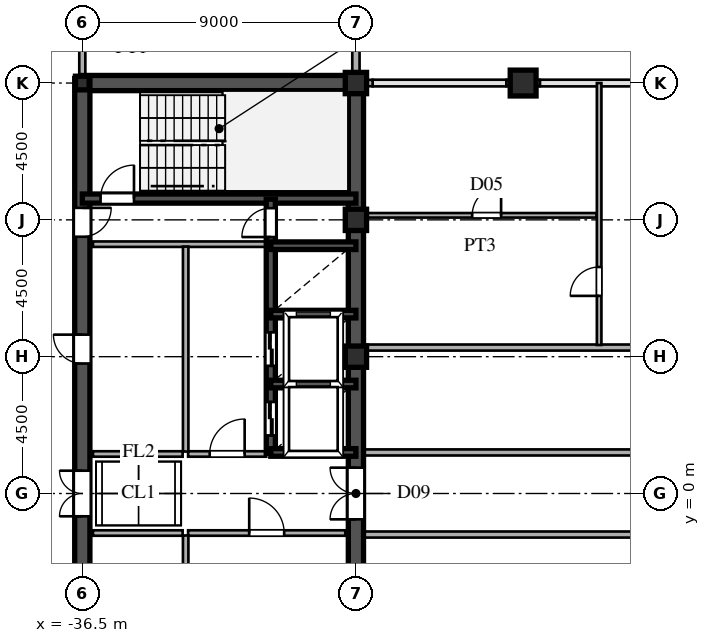
"""IFC4 building model, lengths in metres.
Left out: names, types, materials, properties, quantities, classifications, styles, units other than length and angle.
Written with IfcOpenShell. Run it as: python <this file> out.ifc"""

import sys

from ifc_helpers import new_model, si_unit, direction, frame, frame_2d, origin, origin_2d, place, context, subcontext, project, spatial, rectangle, hollow_rectangle, i_section, extrude, source, transform, mapped, element, fill, save


model = new_model("IFC4")
c1 = context("Model", 3, precision=1e-05, world=origin(), true_north=direction((0.0, 1.0)))
c2 = subcontext(c1, "Body", "Model", "MODEL_VIEW")
j1 = project(units=[si_unit("LENGTHUNIT", "METRE"), si_unit("PLANEANGLEUNIT", "RADIAN")], contexts=[c1])
p1 = place(None, origin())
s1 = spatial("IfcSite", under=j1, at=p1, CompositionType="ELEMENT")
p2 = place(p1, origin())
s2 = spatial("IfcBuilding", under=s1, at=p2, CompositionType="ELEMENT")
p3 = place(p2, frame((0.0, 0.0, 250.65)))
s3 = spatial("IfcBuildingStorey", under=s2, at=p3, CompositionType="ELEMENT", Elevation=250.65)
m1 = source(origin(), c2, "Body", "SweptSolid", [
    extrude(hollow_rectangle(XDim=0.7, YDim=0.7, WallThickness=0.03, at=origin_2d()), origin(), (0.0, 0.0, 1.0), 3.75),
])
for number, where, z_axis, x_axis in (
    (1, (-27.5, 4.5, 0.0), (0.0, 0.0, 1.0), (1.0, 0.0, 0.0)),
    (2, (-27.5, 9.0, 0.0), (0.0, 0.0, 1.0), (1.0, 0.0, 0.0)),
    (3, (-27.5, 13.5, 0.0), (0.0, 0.0, 1.0), (1.0, 0.0, 0.0)),
):
    element("IfcColumn", number, at=place(p3, frame(where, z_axis=z_axis, x_axis=x_axis)), inside=s3, PredefinedType="COLUMN", context=c2, shape_type="MappedRepresentation", body=[
        mapped(m1, transform((0.0, 0.0, 0.0), scale=1.0)),
    ])
m2 = source(origin(), c2, "Body", "SweptSolid", [
    extrude(i_section(OverallWidth=0.45, OverallDepth=0.45, WebThickness=0.016, FlangeThickness=0.025, at=origin_2d()), origin(), (0.0, 0.0, 1.0), 3.75),
])
p4 = place(p3, frame((-36.5, 13.5, 0.0), z_axis=(0.0, 0.0, 1.0), x_axis=(1.0, 0.0, 0.0)))
e4 = element("IfcColumn", 4, at=p4, inside=s3, PredefinedType="COLUMN", context=c2, shape_type="MappedRepresentation", body=[
    mapped(m2, transform((0.0, 0.0, 0.0), scale=1.0)),
])
m3 = source(origin(), c2, "Body", "SweptSolid", [
    extrude(hollow_rectangle(XDim=0.85, YDim=0.85, WallThickness=0.036, at=origin_2d()), origin(), (0.0, 0.0, 1.0), 3.75),
])
p5 = place(p3, frame((-22.0, 13.5, 0.0), z_axis=(0.0, 0.0, 1.0), x_axis=(1.0, 0.0, 0.0)))
e5 = element("IfcColumn", 5, at=p5, inside=s3, PredefinedType="COLUMN", context=c2, shape_type="MappedRepresentation", body=[
    mapped(m3, transform((0.0, 0.0, 0.0), scale=1.0)),
])
p6 = place(p3, frame((-27.5, 13.755, 0.0), z_axis=(0.0, 0.0, 1.0), x_axis=(0.0, 1.0, 0.0)))
e6 = element("IfcWall", 6, at=p6, inside=s3, PredefinedType="SOLIDWALL", context=c2, shape_type="SweptSolid", body=[
    extrude(rectangle(XDim=0.62, YDim=0.24, at=frame_2d((0.31, 0.0))), origin(), (0.0, 0.0, 1.0), 3.03),
])
p7 = place(p3, frame((-27.5, 14.375, 0.0), z_axis=(0.0, 0.0, 1.0), x_axis=(0.0, 1.0, 0.0)))
e7 = element("IfcWall", 7, at=p7, inside=s3, PredefinedType="SOLIDWALL", context=c2, shape_type="SweptSolid", body=[
    extrude(rectangle(XDim=1.605, YDim=0.24, at=frame_2d((0.803, 0.0))), origin(), (0.0, 0.0, 1.0), 3.53),
])
p8 = place(p3, frame((-27.49, 13.5, 0.0), z_axis=(0.0, 0.0, 1.0), x_axis=(1.0, 0.0, 0.0)))
e8 = element("IfcWall", 8, at=p8, inside=s3, PredefinedType="SOLIDWALL", context=c2, shape_type="SweptSolid", body=[
    extrude(rectangle(XDim=0.54, YDim=0.21, at=frame_2d((0.27, 0.0))), origin(), (0.0, 0.0, 1.0), 3.03),
])
p9 = place(p3, frame((-22.55, 13.5, 0.0), z_axis=(0.0, 0.0, 1.0), x_axis=(1.0, 0.0, 0.0)))
e9 = element("IfcWall", 9, at=p9, inside=s3, PredefinedType="SOLIDWALL", context=c2, shape_type="SweptSolid", body=[
    extrude(rectangle(XDim=1.1, YDim=0.21, at=frame_2d((0.55, 0.0))), origin(), (0.0, 0.0, 1.0), 3.03),
])
for number, where, z_axis, x_axis in (
    (10, (-27.5, -13.5, 0.0), (0.0, 0.0, 1.0), (0.0, 1.0, 0.0)),
    (11, (-27.5, 1.3, 0.0), (0.0, 0.0, 1.0), (0.0, 1.0, 0.0)),
):
    element("IfcWall", number, at=place(p3, frame(where, z_axis=z_axis, x_axis=x_axis)), inside=s3, PredefinedType="SHEAR", context=c2, shape_type="SweptSolid", body=[
        extrude(rectangle(XDim=12.2, YDim=0.5, at=frame_2d((6.1, 0.0))), origin(), (0.0, 0.0, 1.0), 3.53),
    ])
p10 = place(p3, frame((-27.5, -1.3, 0.0), z_axis=(0.0, 0.0, 1.0), x_axis=(0.0, 1.0, 0.0)))
e12 = element("IfcWall", 12, at=p10, inside=s3, PredefinedType="SHEAR", context=c2, shape_type="SweptSolid", body=[
    extrude(rectangle(XDim=2.6, YDim=0.5, at=frame_2d((1.3, 0.0))), origin(), (0.0, 0.0, 1.0), 3.53),
])
p11 = place(p10, frame((0.45, 0.0, 0.0)))
e13 = element("IfcOpeningElement", 13, at=p11, cuts=e12, PredefinedType="OPENING", context=c2, shape_type="SweptSolid", body=[
    extrude(rectangle(XDim=1.7, YDim=2.35, at=frame_2d((0.85, 1.175))), frame((0.0, 0.26, 0.0), z_axis=(0.0, -1.0, 0.0), x_axis=(1.0, 0.0, 0.0)), (0.0, 0.0, 1.0), 0.52),
])
p12 = place(p3, frame((-36.5, 13.5, 0.0), z_axis=(0.0, 0.0, 1.0), x_axis=(1.0, 0.0, 0.0)))
e14 = element("IfcWall", 14, at=p12, inside=s3, PredefinedType="SHEAR", context=c2, shape_type="SweptSolid", body=[
    extrude(rectangle(XDim=9.0, YDim=0.5, at=frame_2d((4.5, 0.0))), origin(), (0.0, 0.0, 1.0), 3.53),
])
p13 = place(p3, frame((-36.5, -1.3, 0.0), z_axis=(0.0, 0.0, 1.0), x_axis=(0.0, 1.0, 0.0)))
e15 = element("IfcWall", 15, at=p13, inside=s3, PredefinedType="SHEAR", context=c2, shape_type="SweptSolid", body=[
    extrude(rectangle(XDim=2.6, YDim=0.5, at=frame_2d((1.3, 0.0))), origin(), (0.0, 0.0, 1.0), 3.53),
])
p14 = place(p13, frame((0.55, 0.0, 0.0)))
e16 = element("IfcOpeningElement", 16, at=p14, cuts=e15, PredefinedType="OPENING", context=c2, shape_type="SweptSolid", body=[
    extrude(rectangle(XDim=1.5, YDim=2.3, at=frame_2d((0.75, 1.15))), frame((0.0, 0.26, 0.0), z_axis=(0.0, -1.0, 0.0), x_axis=(1.0, 0.0, 0.0)), (0.0, 0.0, 1.0), 0.52),
])
p15 = place(p3, frame((-36.5, 8.2, 0.0), z_axis=(0.0, 0.0, 1.0), x_axis=(0.0, 1.0, 0.0)))
e17 = element("IfcWall", 17, at=p15, inside=s3, PredefinedType="SHEAR", context=c2, shape_type="SweptSolid", body=[
    extrude(rectangle(XDim=5.45, YDim=0.5, at=frame_2d((2.725, 0.0))), origin(), (0.0, 0.0, 1.0), 3.53),
])
p16 = place(p15, frame((0.245, 0.0, 0.0)))
e18 = element("IfcOpeningElement", 18, at=p16, cuts=e17, PredefinedType="OPENING", context=c2, shape_type="SweptSolid", body=[
    extrude(rectangle(XDim=0.95, YDim=2.15, at=frame_2d((0.475, 1.075))), frame((0.0, 0.26, 0.0), z_axis=(0.0, -1.0, 0.0), x_axis=(1.0, 0.0, 0.0)), (0.0, 0.0, 1.0), 0.52),
])
p17 = place(p3, frame((-36.5, -6.5, 0.0), z_axis=(0.0, 0.0, 1.0), x_axis=(0.0, 1.0, 0.0)))
e19 = element("IfcWall", 19, at=p17, inside=s3, PredefinedType="SHEAR", context=c2, shape_type="SweptSolid", body=[
    extrude(rectangle(XDim=5.2, YDim=0.5, at=frame_2d((2.6, 0.0))), origin(), (0.0, 0.0, 1.0), 3.53),
])
p18 = place(p17, frame((2.125, 0.0, 0.0)))
e20 = element("IfcOpeningElement", 20, at=p18, cuts=e19, PredefinedType="OPENING", context=c2, shape_type="SweptSolid", body=[
    extrude(rectangle(XDim=0.95, YDim=2.15, at=frame_2d((0.475, 1.075))), frame((0.0, 0.26, 0.0), z_axis=(0.0, -1.0, 0.0), x_axis=(1.0, 0.0, 0.0)), (0.0, 0.0, 1.0), 0.52),
])
p19 = place(p3, frame((-36.5, 1.3, 0.0), z_axis=(0.0, 0.0, 1.0), x_axis=(0.0, 1.0, 0.0)))
e21 = element("IfcWall", 21, at=p19, inside=s3, PredefinedType="SHEAR", context=c2, shape_type="SweptSolid", body=[
    extrude(rectangle(XDim=6.9, YDim=0.5, at=frame_2d((3.45, 0.0))), origin(), (0.0, 0.0, 1.0), 3.53),
])
p20 = place(p19, frame((2.975, 0.0, 0.0)))
e22 = element("IfcOpeningElement", 22, at=p20, cuts=e21, PredefinedType="OPENING", context=c2, shape_type="SweptSolid", body=[
    extrude(rectangle(XDim=0.95, YDim=2.15, at=frame_2d((0.475, 1.075))), frame((0.0, 0.26, 0.0), z_axis=(0.0, -1.0, 0.0), x_axis=(1.0, 0.0, 0.0)), (0.0, 0.0, 1.0), 0.52),
])
p21 = place(p3, frame((-36.5, 9.7, 0.0), z_axis=(0.0, 0.0, 1.0), x_axis=(1.0, 0.0, 0.0)))
e23 = element("IfcWall", 23, at=p21, inside=s3, PredefinedType="SHEAR", context=c2, shape_type="SweptSolid", body=[
    extrude(rectangle(XDim=9.0, YDim=0.3, at=frame_2d((4.5, 0.0))), origin(), (0.0, 0.0, 1.0), 3.53),
])
p22 = place(p21, frame((0.6, 0.0, 0.0)))
e24 = element("IfcOpeningElement", 24, at=p22, cuts=e23, PredefinedType="OPENING", context=c2, shape_type="SweptSolid", body=[
    extrude(rectangle(XDim=1.1, YDim=2.2, at=frame_2d((0.55, 1.1))), frame((0.0, 0.16, 0.0), z_axis=(0.0, -1.0, 0.0), x_axis=(1.0, 0.0, 0.0)), (0.0, 0.0, 1.0), 0.32),
])
for number, where, z_axis, x_axis in (
    (25, (-30.3, 1.35, 0.0), (0.0, 0.0, 1.0), (1.0, 0.0, 0.0)),
    (26, (-30.3, 3.6, 0.0), (0.0, 0.0, 1.0), (1.0, 0.0, 0.0)),
    (27, (-30.3, 5.9, 0.0), (0.0, 0.0, 1.0), (1.0, 0.0, 0.0)),
    (28, (-30.3, 8.15, 0.0), (0.0, 0.0, 1.0), (1.0, 0.0, 0.0)),
):
    element("IfcWall", number, at=place(p3, frame(where, z_axis=z_axis, x_axis=x_axis)), inside=s3, PredefinedType="SHEAR", context=c2, shape_type="SweptSolid", body=[
        extrude(rectangle(XDim=2.8, YDim=0.25, at=frame_2d((1.4, 0.0))), origin(), (0.0, 0.0, 1.0), 3.53),
    ])
p23 = place(p3, frame((-30.3, 1.32, 0.0), z_axis=(0.0, 0.0, 1.0), x_axis=(0.0, 1.0, 0.0)))
e29 = element("IfcWall", 29, at=p23, inside=s3, PredefinedType="SHEAR", context=c2, shape_type="SweptSolid", body=[
    extrude(rectangle(XDim=2.28, YDim=0.3, at=frame_2d((1.14, 0.0))), origin(), (0.0, 0.0, 1.0), 3.53),
])
p24 = place(p23, frame((0.59, 0.0, 0.0)))
e30 = element("IfcOpeningElement", 30, at=p24, cuts=e29, PredefinedType="OPENING", context=c2, shape_type="SweptSolid", body=[
    extrude(rectangle(XDim=1.1, YDim=2.2, at=frame_2d((0.55, 1.1))), frame((0.0, 0.16, 0.0), z_axis=(0.0, -1.0, 0.0), x_axis=(1.0, 0.0, 0.0)), (0.0, 0.0, 1.0), 0.32),
])
p25 = place(p3, frame((-30.3, 3.6, 0.0), z_axis=(0.0, 0.0, 1.0), x_axis=(0.0, 1.0, 0.0)))
e31 = element("IfcWall", 31, at=p25, inside=s3, PredefinedType="SHEAR", context=c2, shape_type="SweptSolid", body=[
    extrude(rectangle(XDim=2.3, YDim=0.3, at=frame_2d((1.15, 0.0))), origin(), (0.0, 0.0, 1.0), 3.53),
])
p26 = place(p25, frame((0.6, 0.0, 0.0)))
e32 = element("IfcOpeningElement", 32, at=p26, cuts=e31, PredefinedType="OPENING", context=c2, shape_type="SweptSolid", body=[
    extrude(rectangle(XDim=1.1, YDim=2.2, at=frame_2d((0.55, 1.1))), frame((0.0, 0.16, 0.0), z_axis=(0.0, -1.0, 0.0), x_axis=(1.0, 0.0, 0.0)), (0.0, 0.0, 1.0), 0.32),
])
p27 = place(p3, frame((-30.3, 5.9, 0.0), z_axis=(0.0, 0.0, 1.0), x_axis=(0.0, 1.0, 0.0)))
e33 = element("IfcWall", 33, at=p27, inside=s3, PredefinedType="SHEAR", context=c2, shape_type="SweptSolid", body=[
    extrude(rectangle(XDim=2.25, YDim=0.3, at=frame_2d((1.125, 0.0))), origin(), (0.0, 0.0, 1.0), 3.53),
])
p28 = place(p3, frame((-30.3, 8.15, 0.0), z_axis=(0.0, 0.0, 1.0), x_axis=(0.0, 1.0, 0.0)))
e34 = element("IfcWall", 34, at=p28, inside=s3, PredefinedType="SHEAR", context=c2, shape_type="SweptSolid", body=[
    extrude(rectangle(XDim=1.53, YDim=0.3, at=frame_2d((0.765, 0.0))), origin(), (0.0, 0.0, 1.0), 3.53),
])
p29 = place(p28, frame((0.285, 0.0, 0.0)))
e35 = element("IfcOpeningElement", 35, at=p29, cuts=e34, PredefinedType="OPENING", context=c2, shape_type="SweptSolid", body=[
    extrude(rectangle(XDim=0.95, YDim=2.15, at=frame_2d((0.475, 1.075))), frame((0.0, 0.16, 0.0), z_axis=(0.0, -1.0, 0.0), x_axis=(1.0, 0.0, 0.0)), (0.0, 0.0, 1.0), 0.32),
])
p30 = place(p3, frame((-36.15, 8.2, 0.0), z_axis=(0.0, 0.0, 1.0), x_axis=(1.0, 0.0, 0.0)))
e36 = element("IfcWall", 36, at=p30, inside=s3, PredefinedType="PARTITIONING", context=c2, shape_type="SweptSolid", body=[
    extrude(rectangle(XDim=5.7, YDim=0.18, at=frame_2d((2.85, 0.0))), origin(), (0.0, 0.0, 1.0), 3.53),
])
p31 = place(p3, frame((-33.1, -6.42, 0.0), z_axis=(0.0, 0.0, 1.0), x_axis=(0.0, 1.0, 0.0)))
e37 = element("IfcWall", 37, at=p31, inside=s3, PredefinedType="PARTITIONING", context=c2, shape_type="SweptSolid", body=[
    extrude(rectangle(XDim=5.04, YDim=0.18, at=frame_2d((2.52, 0.0))), origin(), (0.0, 0.0, 1.0), 3.53),
])
p32 = place(p3, frame((-33.1, 1.38, 0.0), z_axis=(0.0, 0.0, 1.0), x_axis=(0.0, 1.0, 0.0)))
e38 = element("IfcWall", 38, at=p32, inside=s3, PredefinedType="PARTITIONING", context=c2, shape_type="SweptSolid", body=[
    extrude(rectangle(XDim=6.74, YDim=0.18, at=frame_2d((3.37, 0.0))), origin(), (0.0, 0.0, 1.0), 3.53),
])
p33 = place(p3, frame((-33.02, -1.3, 0.0), z_axis=(0.0, 0.0, 1.0), x_axis=(1.0, 0.0, 0.0)))
e39 = element("IfcWall", 39, at=p33, inside=s3, PredefinedType="PARTITIONING", context=c2, shape_type="SweptSolid", body=[
    extrude(rectangle(XDim=5.17, YDim=0.18, at=frame_2d((2.585, 0.0))), origin(), (0.0, 0.0, 1.0), 3.53),
])
p34 = place(p33, frame((2.01, 0.0, 0.0)))
e40 = element("IfcOpeningElement", 40, at=p34, cuts=e39, PredefinedType="OPENING", context=c2, shape_type="SweptSolid", body=[
    extrude(rectangle(XDim=1.15, YDim=2.2, at=frame_2d((0.575, 1.1))), frame((0.0, 0.1, 0.0), z_axis=(0.0, -1.0, 0.0), x_axis=(1.0, 0.0, 0.0)), (0.0, 0.0, 1.0), 0.2),
])
p35 = place(p3, frame((-33.02, 1.3, 0.0), z_axis=(0.0, 0.0, 1.0), x_axis=(1.0, 0.0, 0.0)))
e41 = element("IfcWall", 41, at=p35, inside=s3, PredefinedType="PARTITIONING", context=c2, shape_type="SweptSolid", body=[
    extrude(rectangle(XDim=2.57, YDim=0.18, at=frame_2d((1.285, 0.0))), origin(), (0.0, 0.0, 1.0), 3.53),
])
p36 = place(p35, frame((0.71, 0.0, 0.0)))
e42 = element("IfcOpeningElement", 42, at=p36, cuts=e41, PredefinedType="OPENING", context=c2, shape_type="SweptSolid", body=[
    extrude(rectangle(XDim=1.15, YDim=2.2, at=frame_2d((0.575, 1.1))), frame((0.0, 0.1, 0.0), z_axis=(0.0, -1.0, 0.0), x_axis=(1.0, 0.0, 0.0)), (0.0, 0.0, 1.0), 0.2),
])
for number, where, z_axis, x_axis in (
    (43, (-36.15, -1.3, 0.0), (0.0, 0.0, 1.0), (1.0, 0.0, 0.0)),
    (44, (-36.15, 1.3, 0.0), (0.0, 0.0, 1.0), (1.0, 0.0, 0.0)),
):
    element("IfcWall", number, at=place(p3, frame(where, z_axis=z_axis, x_axis=x_axis)), inside=s3, PredefinedType="PARTITIONING", context=c2, shape_type="SweptSolid", body=[
        extrude(rectangle(XDim=2.95, YDim=0.18, at=frame_2d((1.475, 0.0))), origin(), (0.0, 0.0, 1.0), 3.53),
    ])
p37 = place(p3, frame((-27.245, -1.35, 0.0), z_axis=(0.0, 0.0, 1.0), x_axis=(1.0, 0.0, 0.0)))
e45 = element("IfcWall", 45, at=p37, inside=s3, PredefinedType="PARTITIONING", context=c2, shape_type="SweptSolid", body=[
    extrude(rectangle(XDim=20.16, YDim=0.2, at=frame_2d((10.08, 0.0))), origin(), (0.0, 0.0, 1.0), 3.53),
])
p38 = place(p37, frame((12.97, 0.0, 0.0)))
e46 = element("IfcOpeningElement", 46, at=p38, cuts=e45, PredefinedType="OPENING", context=c2, shape_type="SweptSolid", body=[
    extrude(rectangle(XDim=1.05, YDim=2.25, at=frame_2d((0.525, 1.125))), frame((0.0, 0.11, 0.0), z_axis=(0.0, -1.0, 0.0), x_axis=(1.0, 0.0, 0.0)), (0.0, 0.0, 1.0), 0.22),
])
p39 = place(p3, frame((-27.245, 1.35, 0.0), z_axis=(0.0, 0.0, 1.0), x_axis=(1.0, 0.0, 0.0)))
e47 = element("IfcWall", 47, at=p39, inside=s3, PredefinedType="PARTITIONING", context=c2, shape_type="SweptSolid", body=[
    extrude(rectangle(XDim=20.16, YDim=0.2, at=frame_2d((10.08, 0.0))), origin(), (0.0, 0.0, 1.0), 3.53),
])
p40 = place(p39, frame((12.97, 0.0, 0.0)))
e48 = element("IfcOpeningElement", 48, at=p40, cuts=e47, PredefinedType="OPENING", context=c2, shape_type="SweptSolid", body=[
    extrude(rectangle(XDim=1.05, YDim=2.25, at=frame_2d((0.525, 1.125))), frame((0.0, 0.11, 0.0), z_axis=(0.0, -1.0, 0.0), x_axis=(1.0, 0.0, 0.0)), (0.0, 0.0, 1.0), 0.22),
])
p41 = place(p3, frame((-27.245, 4.8, 0.0), z_axis=(0.0, 0.0, 1.0), x_axis=(1.0, 0.0, 0.0)))
e49 = element("IfcWall", 49, at=p41, inside=s3, PredefinedType="PARTITIONING", context=c2, shape_type="SweptSolid", body=[
    extrude(rectangle(XDim=54.49, YDim=0.2, at=frame_2d((27.245, 0.0))), origin(), (0.0, 0.0, 1.0), 3.53),
])
p42 = place(p41, frame((24.97, 0.0, 0.0)))
e50 = element("IfcOpeningElement", 50, at=p42, cuts=e49, PredefinedType="OPENING", context=c2, shape_type="SweptSolid", body=[
    extrude(rectangle(XDim=1.05, YDim=2.25, at=frame_2d((0.525, 1.125))), frame((0.0, 0.11, 0.0), z_axis=(0.0, -1.0, 0.0), x_axis=(1.0, 0.0, 0.0)), (0.0, 0.0, 1.0), 0.22),
])
p43 = place(p3, frame((-27.245, 9.15, 0.0), z_axis=(0.0, 0.0, 1.0), x_axis=(1.0, 0.0, 0.0)))
e51 = element("IfcWall", 51, at=p43, inside=s3, PredefinedType="PARTITIONING", context=c2, shape_type="SweptSolid", body=[
    extrude(rectangle(XDim=7.66, YDim=0.15, at=frame_2d((3.83, 0.0))), origin(), (0.0, 0.0, 1.0), 3.53),
])
p44 = place(p43, frame((3.57, 0.0, 0.0)))
e52 = element("IfcOpeningElement", 52, at=p44, cuts=e51, PredefinedType="OPENING", context=c2, shape_type="SweptSolid", body=[
    extrude(rectangle(XDim=0.95, YDim=2.15, at=frame_2d((0.475, 1.075))), frame((0.0, 0.085, 0.0), z_axis=(0.0, -1.0, 0.0), x_axis=(1.0, 0.0, 0.0)), (0.0, 0.0, 1.0), 0.17),
])
p45 = place(p3, frame((-36.5, 13.755, 0.0), z_axis=(0.0, 0.0, 1.0), x_axis=(0.0, 1.0, 0.0)))
e53 = element("IfcWall", 53, at=p45, inside=s3, PredefinedType="PARTITIONING", context=c2, shape_type="SweptSolid", body=[
    extrude(rectangle(XDim=1.76, YDim=0.2, at=frame_2d((0.88, 0.0))), origin(), (0.0, 0.0, 1.0), 2.93),
])
p46 = place(p3, frame((-19.5, 4.885, 0.0), z_axis=(0.0, 0.0, 1.0), x_axis=(0.0, 1.0, 0.0)))
e54 = element("IfcWall", 54, at=p46, inside=s3, PredefinedType="PARTITIONING", context=c2, shape_type="SweptSolid", body=[
    extrude(rectangle(XDim=8.615, YDim=0.15, at=frame_2d((4.308, 0.0))), origin(), (0.0, 0.0, 1.0), 3.53),
])
p47 = place(p46, frame((1.615, 0.0, 0.0)))
e55 = element("IfcOpeningElement", 55, at=p47, cuts=e54, PredefinedType="OPENING", context=c2, shape_type="SweptSolid", body=[
    extrude(rectangle(XDim=0.95, YDim=2.15, at=frame_2d((0.475, 1.075))), frame((0.0, 0.085, 0.0), z_axis=(0.0, -1.0, 0.0), x_axis=(1.0, 0.0, 0.0)), (0.0, 0.0, 1.0), 0.17),
])
m4 = source(origin(), c2, "Body", "SweptSolid", [
    extrude(rectangle(XDim=1.7, YDim=2.35, at=frame_2d((0.85, 1.175))), frame((0.0, 0.025, 0.0), z_axis=(0.0, -1.0, 0.0), x_axis=(1.0, 0.0, 0.0)), (0.0, 0.0, 1.0), 0.05),
])
p48 = place(p11, origin())
e56 = element("IfcDoor", 56, at=p48, inside=s3, OperationType="DOUBLE_SWING_LEFT", PredefinedType="DOOR", context=c2, shape_type="MappedRepresentation", body=[
    mapped(m4, transform((0.0, 0.0, 0.0), scale=1.0)),
])
fill(e13, e56)
m5 = source(origin(), c2, "Body", "SweptSolid", [
    extrude(rectangle(XDim=1.5, YDim=2.3, at=frame_2d((0.75, 1.15))), frame((0.0, 0.025, 0.0), z_axis=(0.0, -1.0, 0.0), x_axis=(1.0, 0.0, 0.0)), (0.0, 0.0, 1.0), 0.05),
])
p49 = place(p14, origin())
e57 = element("IfcDoor", 57, at=p49, inside=s3, OperationType="DOUBLE_SWING_LEFT", PredefinedType="DOOR", context=c2, shape_type="MappedRepresentation", body=[
    mapped(m5, transform((0.0, 0.0, 0.0), scale=1.0)),
])
fill(e16, e57)
m6 = source(origin(), c2, "Body", "SweptSolid", [
    extrude(rectangle(XDim=0.95, YDim=2.15, at=frame_2d((0.475, 1.075))), frame((0.0, 0.025, 0.0), z_axis=(0.0, -1.0, 0.0), x_axis=(1.0, 0.0, 0.0)), (0.0, 0.0, 1.0), 0.05),
])
p50 = place(p16, frame((0.95, 0.0, 0.0), z_axis=(0.0, 0.0, 1.0), x_axis=(-1.0, 0.0, 0.0)))
e58 = element("IfcDoor", 58, at=p50, inside=s3, OperationType="SINGLE_SWING_RIGHT", PredefinedType="DOOR", context=c2, shape_type="MappedRepresentation", body=[
    mapped(m6, transform((0.0, 0.0, 0.0), scale=1.0)),
])
fill(e18, e58)
p51 = place(p20, origin())
e59 = element("IfcDoor", 59, at=p51, inside=s3, OperationType="SINGLE_SWING_RIGHT", PredefinedType="DOOR", context=c2, shape_type="MappedRepresentation", body=[
    mapped(m6, transform((0.0, 0.0, 0.0), scale=1.0)),
])
fill(e22, e59)
m7 = source(origin(), c2, "Body", "SweptSolid", [
    extrude(rectangle(XDim=1.1, YDim=2.2, at=frame_2d((0.55, 1.1))), frame((0.0, 0.025, 0.0), z_axis=(0.0, -1.0, 0.0), x_axis=(1.0, 0.0, 0.0)), (0.0, 0.0, 1.0), 0.05),
])
p52 = place(p22, origin())
e60 = element("IfcDoor", 60, at=p52, inside=s3, OperationType="SINGLE_SWING_RIGHT", PredefinedType="DOOR", context=c2, shape_type="MappedRepresentation", body=[
    mapped(m7, transform((0.0, 0.0, 0.0), scale=1.0)),
])
fill(e24, e60)
m8 = source(origin(), c2, "Body", "SweptSolid", [
    extrude(rectangle(XDim=1.1, YDim=2.2, at=frame_2d((0.55, 1.1))), frame((0.0, 0.025, 0.0), z_axis=(0.0, -1.0, 0.0), x_axis=(1.0, 0.0, 0.0)), (0.0, 0.0, 1.0), 0.05),
])
p53 = place(p24, origin())
e61 = element("IfcDoor", 61, at=p53, inside=s3, OperationType="DOUBLE_DOOR_SLIDING", PredefinedType="DOOR", context=c2, shape_type="MappedRepresentation", body=[
    mapped(m8, transform((0.0, 0.0, 0.0), scale=1.0)),
])
fill(e30, e61)
p54 = place(p26, origin())
e62 = element("IfcDoor", 62, at=p54, inside=s3, OperationType="DOUBLE_DOOR_SLIDING", PredefinedType="DOOR", context=c2, shape_type="MappedRepresentation", body=[
    mapped(m8, transform((0.0, 0.0, 0.0), scale=1.0)),
])
fill(e32, e62)
p55 = place(p29, origin())
e63 = element("IfcDoor", 63, at=p55, inside=s3, OperationType="SINGLE_SWING_LEFT", PredefinedType="DOOR", context=c2, shape_type="MappedRepresentation", body=[
    mapped(m6, transform((0.0, 0.0, 0.0), scale=1.0)),
])
fill(e35, e63)
m9 = source(origin(), c2, "Body", "SweptSolid", [
    extrude(rectangle(XDim=1.15, YDim=2.2, at=frame_2d((0.575, 1.1))), frame((0.0, 0.025, 0.0), z_axis=(0.0, -1.0, 0.0), x_axis=(1.0, 0.0, 0.0)), (0.0, 0.0, 1.0), 0.05),
])
p56 = place(p34, origin())
e64 = element("IfcDoor", 64, at=p56, inside=s3, OperationType="SINGLE_SWING_LEFT", PredefinedType="DOOR", context=c2, shape_type="MappedRepresentation", body=[
    mapped(m9, transform((0.0, 0.0, 0.0), scale=1.0)),
])
fill(e40, e64)
p57 = place(p36, origin())
e65 = element("IfcDoor", 65, at=p57, inside=s3, OperationType="SINGLE_SWING_RIGHT", PredefinedType="DOOR", context=c2, shape_type="MappedRepresentation", body=[
    mapped(m9, transform((0.0, 0.0, 0.0), scale=1.0)),
])
fill(e42, e65)
m10 = source(origin(), c2, "Body", "SweptSolid", [
    extrude(rectangle(XDim=0.95, YDim=2.15, at=frame_2d((0.475, 1.075))), frame((0.0, 0.025, 0.0), z_axis=(0.0, -1.0, 0.0), x_axis=(1.0, 0.0, 0.0)), (0.0, 0.0, 1.0), 0.05),
])
p58 = place(p44, origin())
e66 = element("IfcDoor", 66, at=p58, inside=s3, OperationType="SINGLE_SWING_RIGHT", PredefinedType="DOOR", context=c2, shape_type="MappedRepresentation", body=[
    mapped(m10, transform((0.0, 0.0, 0.0), scale=1.0)),
])
fill(e52, e66)
p59 = place(p47, origin())
e67 = element("IfcDoor", 67, at=p59, inside=s3, OperationType="SINGLE_SWING_LEFT", PredefinedType="DOOR", context=c2, shape_type="MappedRepresentation", body=[
    mapped(m10, transform((0.0, 0.0, 0.0), scale=1.0)),
])
fill(e55, e67)
save(model, sys.argv[1])
